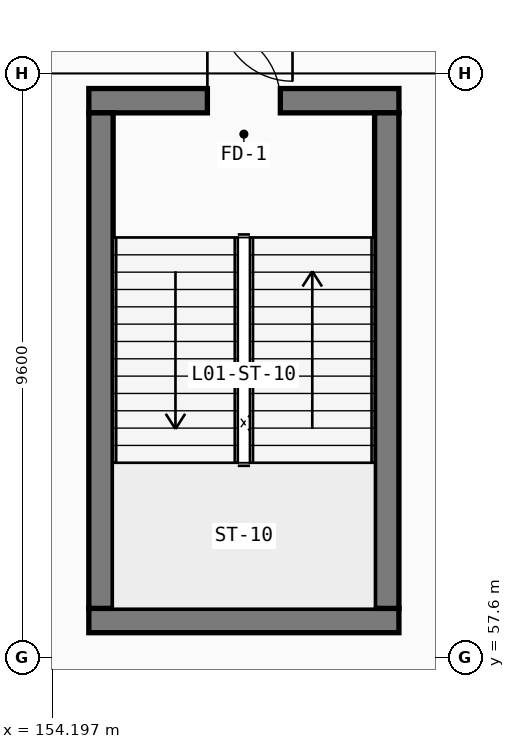
"""IFC4 building model, lengths in metres.
Left out: names, types, materials, properties, quantities, classifications, styles, units other than length and angle.
Written with IfcOpenShell. Run it as: python <this file> out.ifc"""

import sys

from ifc_helpers import new_model, si_unit, direction, frame, frame_2d, origin, place, context, subcontext, project, spatial, rectangle, extrude, element, fill, save


model = new_model("IFC4")
c1 = context("Model", 3, precision=1e-05, world=origin(), true_north=direction((0.0, 1.0)))
c2 = subcontext(c1, "Body", "Model", "MODEL_VIEW")
j1 = project(units=[si_unit("LENGTHUNIT", "METRE"), si_unit("PLANEANGLEUNIT", "RADIAN")], contexts=[c1])
p1 = place(None, origin())
s1 = spatial("IfcSite", under=j1, at=p1, CompositionType="ELEMENT")
p2 = place(p1, origin())
s2 = spatial("IfcBuilding", under=s1, at=p2, CompositionType="ELEMENT")
p3 = place(p2, frame((0.0, 0.0, 4.8)))
s3 = spatial("IfcBuildingStorey", under=s2, at=p3, CompositionType="ELEMENT", Elevation=4.8)
p4 = place(p3, frame((154.8, 58.2, 0.0), z_axis=(0.0, 0.0, 1.0), x_axis=(1.0, 0.0, 0.0)))
e1 = element("IfcWall", 1, at=p4, inside=s3, PredefinedType="SHEAR", context=c2, shape_type="SweptSolid", body=[
    extrude(rectangle(XDim=5.1, YDim=0.4, at=frame_2d((2.55, 0.0))), origin(), (0.0, 0.0, 1.0), 4.52),
])
p5 = place(p3, frame((159.9, 66.75, 0.0), z_axis=(0.0, 0.0, 1.0), x_axis=(-1.0, 0.0, 0.0)))
e2 = element("IfcWall", 2, at=p5, inside=s3, PredefinedType="SHEAR", context=c2, shape_type="SweptSolid", body=[
    extrude(rectangle(XDim=5.1, YDim=0.4, at=frame_2d((2.55, 0.0))), origin(), (0.0, 0.0, 1.0), 4.52),
])
p6 = place(p5, frame((3.15, 0.0, 0.0), z_axis=(0.0, 0.0, 1.0), x_axis=(-1.0, 0.0, 0.0)))
e3 = element("IfcOpeningElement", 3, at=p6, cuts=e2, PredefinedType="OPENING", context=c2, shape_type="SweptSolid", body=[
    extrude(rectangle(XDim=1.2, YDim=2.2, at=frame_2d((0.6, 1.1))), frame((0.0, 0.21, 0.0), z_axis=(0.0, -1.0, 0.0), x_axis=(1.0, 0.0, 0.0)), (0.0, 0.0, 1.0), 0.42),
])
for number, where, z_axis, x_axis in (
    (4, (155.0, 66.55, 0.0), (0.0, 0.0, 1.0), (0.0, -1.0, 0.0)),
    (5, (159.7, 58.4, 0.0), (0.0, 0.0, 1.0), (0.0, 1.0, 0.0)),
):
    element("IfcWall", number, at=place(p3, frame(where, z_axis=z_axis, x_axis=x_axis)), inside=s3, PredefinedType="SHEAR", context=c2, shape_type="SweptSolid", body=[
        extrude(rectangle(XDim=8.15, YDim=0.4, at=frame_2d((4.075, 0.0))), origin(), (0.0, 0.0, 1.0), 4.52),
    ])
p7 = place(p6, origin())
e6 = element("IfcDoor", 6, at=p7, inside=s3, OperationType="SINGLE_SWING_LEFT", PredefinedType="DOOR", context=c2, shape_type="SweptSolid", body=[
    extrude(rectangle(XDim=1.2, YDim=2.2, at=frame_2d((0.6, 1.1))), frame((0.0, 0.025, 0.0), z_axis=(0.0, -1.0, 0.0), x_axis=(1.0, 0.0, 0.0)), (0.0, 0.0, 1.0), 0.05),
])
fill(e3, e6)
save(model, sys.argv[1])
